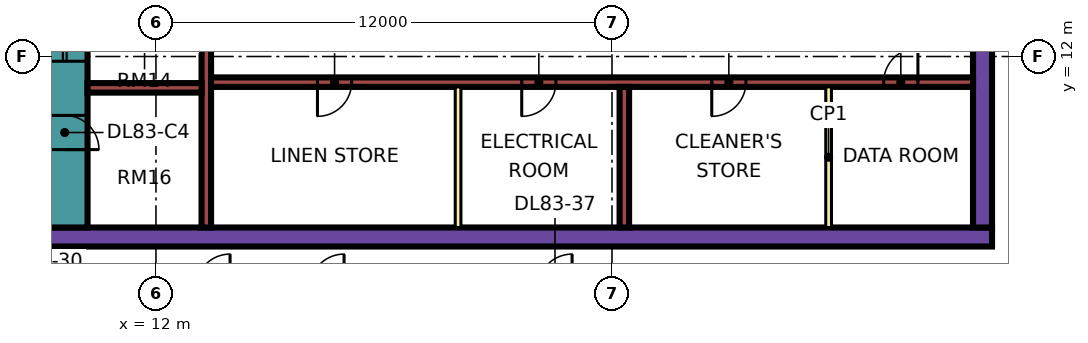
"""IFC4 building model, lengths in metres.
Left out: names, types, materials, properties, quantities, classifications, styles, units other than length and angle.
Written with IfcOpenShell. Run it as: python <this file> out.ifc"""

import sys

from ifc_helpers import new_model, si_unit, direction, frame, frame_2d, origin, place, context, subcontext, project, spatial, rectangle, extrude, element, fill, save


model = new_model("IFC4")
c1 = context("Model", 3, precision=1e-05, world=origin(), true_north=direction((0.0, 1.0)))
c2 = subcontext(c1, "Body", "Model", "MODEL_VIEW")
j1 = project(units=[si_unit("LENGTHUNIT", "METRE"), si_unit("PLANEANGLEUNIT", "RADIAN")], contexts=[c1])
p1 = place(None, origin())
s1 = spatial("IfcSite", under=j1, at=p1, CompositionType="ELEMENT")
p2 = place(p1, origin())
s2 = spatial("IfcBuilding", under=s1, at=p2, CompositionType="ELEMENT")
p3 = place(p2, frame((0.0, 0.0, 357.65)))
s3 = spatial("IfcBuildingStorey", under=s2, at=p3, CompositionType="ELEMENT", Elevation=357.65)
p4 = place(p3, frame((9.0, 7.25, 0.0), z_axis=(0.0, 0.0, 1.0), x_axis=(1.0, 0.0, 0.0)))
e1 = element("IfcWall", 1, at=p4, inside=s3, PredefinedType="SHEAR", context=c2, shape_type="SweptSolid", body=[
    extrude(rectangle(XDim=25.0, YDim=0.5, at=frame_2d((12.5, 0.0))), origin(), (0.0, 0.0, 1.0), 3.75),
])
p5 = place(p3, frame((9.6, 7.5, 0.0), z_axis=(0.0, 0.0, 1.0), x_axis=(0.0, 1.0, 0.0)))
e2 = element("IfcWall", 2, at=p5, inside=s3, PredefinedType="SHEAR", context=c2, shape_type="SweptSolid", body=[
    extrude(rectangle(XDim=12.0, YDim=1.2, at=frame_2d((6.0, 0.0))), origin(), (0.0, 0.0, 1.0), 3.75),
])
p6 = place(p5, frame((4.375, 0.0, 0.0)))
e3 = element("IfcOpeningElement", 3, at=p6, cuts=e2, PredefinedType="OPENING", context=c2, shape_type="SweptSolid", body=[
    extrude(rectangle(XDim=1.1, YDim=2.2, at=frame_2d((0.55, 1.1))), frame((0.0, 0.61, 0.0), z_axis=(0.0, -1.0, 0.0), x_axis=(1.0, 0.0, 0.0)), (0.0, 0.0, 1.0), 1.22),
])
p7 = place(p5, frame((6.875, 0.0, 0.0)))
e4 = element("IfcOpeningElement", 4, at=p7, cuts=e2, PredefinedType="OPENING", context=c2, shape_type="SweptSolid", body=[
    extrude(rectangle(XDim=1.1, YDim=2.2, at=frame_2d((0.55, 1.1))), frame((0.0, 0.61, 0.0), z_axis=(0.0, -1.0, 0.0), x_axis=(1.0, 0.0, 0.0)), (0.0, 0.0, 1.0), 1.22),
])
p8 = place(p5, frame((9.85, 0.0, 0.0)))
e5 = element("IfcOpeningElement", 5, at=p8, cuts=e2, PredefinedType="OPENING", context=c2, shape_type="SweptSolid", body=[
    extrude(rectangle(XDim=1.1, YDim=2.2, at=frame_2d((0.55, 1.1))), frame((0.0, 0.61, 0.0), z_axis=(0.0, -1.0, 0.0), x_axis=(1.0, 0.0, 0.0)), (0.0, 0.0, 1.0), 1.22),
])
p9 = place(p5, frame((2.05, 0.0, 0.0)))
e6 = element("IfcOpeningElement", 6, at=p9, cuts=e2, PredefinedType="OPENING", context=c2, shape_type="SweptSolid", body=[
    extrude(rectangle(XDim=0.9, YDim=2.1, at=frame_2d((0.45, 1.05))), frame((0.0, 0.61, 0.0), z_axis=(0.0, -1.0, 0.0), x_axis=(1.0, 0.0, 0.0)), (0.0, 0.0, 1.0), 1.22),
])
p10 = place(p3, frame((33.75, 7.5, 0.0), z_axis=(0.0, 0.0, 1.0), x_axis=(0.0, 1.0, 0.0)))
e7 = element("IfcWall", 7, at=p10, inside=s3, PredefinedType="SHEAR", context=c2, shape_type="SweptSolid", body=[
    extrude(rectangle(XDim=12.0, YDim=0.5, at=frame_2d((6.0, 0.0))), origin(), (0.0, 0.0, 1.0), 3.75),
])
p11 = place(p10, frame((5.7, 0.0, 0.0)))
e8 = element("IfcOpeningElement", 8, at=p11, cuts=e7, PredefinedType="OPENING", context=c2, shape_type="SweptSolid", body=[
    extrude(rectangle(XDim=1.8, YDim=2.4, at=frame_2d((0.9, 1.2))), frame((0.0, 0.26, 0.0), z_axis=(0.0, -1.0, 0.0), x_axis=(1.0, 0.0, 0.0)), (0.0, 0.0, 1.0), 0.52),
])
p12 = place(p3, frame((13.325, 7.5, 0.0), z_axis=(0.0, 0.0, 1.0), x_axis=(0.0, 1.0, 0.0)))
e9 = element("IfcWall", 9, at=p12, inside=s3, PredefinedType="SHEAR", context=c2, shape_type="SweptSolid", body=[
    extrude(rectangle(XDim=12.0, YDim=0.25, at=frame_2d((6.0, 0.0))), origin(), (0.0, 0.0, 1.0), 3.75),
])
p13 = place(p3, frame((13.45, 11.325, 0.0), z_axis=(0.0, 0.0, 1.0), x_axis=(1.0, 0.0, 0.0)))
e10 = element("IfcWall", 10, at=p13, inside=s3, PredefinedType="SHEAR", context=c2, shape_type="SweptSolid", body=[
    extrude(rectangle(XDim=20.05, YDim=0.25, at=frame_2d((10.025, 0.0))), origin(), (0.0, 0.0, 1.0), 3.75),
])
p14 = place(p13, frame((2.8, 0.0, 0.0)))
e11 = element("IfcOpeningElement", 11, at=p14, cuts=e10, PredefinedType="OPENING", context=c2, shape_type="SweptSolid", body=[
    extrude(rectangle(XDim=0.9, YDim=2.1, at=frame_2d((0.45, 1.05))), frame((0.0, 0.135, 0.0), z_axis=(0.0, -1.0, 0.0), x_axis=(1.0, 0.0, 0.0)), (0.0, 0.0, 1.0), 0.27),
])
p15 = place(p13, frame((8.175, 0.0, 0.0)))
e12 = element("IfcOpeningElement", 12, at=p15, cuts=e10, PredefinedType="OPENING", context=c2, shape_type="SweptSolid", body=[
    extrude(rectangle(XDim=0.9, YDim=2.1, at=frame_2d((0.45, 1.05))), frame((0.0, 0.135, 0.0), z_axis=(0.0, -1.0, 0.0), x_axis=(1.0, 0.0, 0.0)), (0.0, 0.0, 1.0), 0.27),
])
p16 = place(p13, frame((13.175, 0.0, 0.0)))
e13 = element("IfcOpeningElement", 13, at=p16, cuts=e10, PredefinedType="OPENING", context=c2, shape_type="SweptSolid", body=[
    extrude(rectangle(XDim=0.9, YDim=2.1, at=frame_2d((0.45, 1.05))), frame((0.0, 0.135, 0.0), z_axis=(0.0, -1.0, 0.0), x_axis=(1.0, 0.0, 0.0)), (0.0, 0.0, 1.0), 0.27),
])
p17 = place(p13, frame((17.7, 0.0, 0.0)))
e14 = element("IfcOpeningElement", 14, at=p17, cuts=e10, PredefinedType="OPENING", context=c2, shape_type="SweptSolid", body=[
    extrude(rectangle(XDim=0.9, YDim=2.1, at=frame_2d((0.45, 1.05))), frame((0.0, 0.135, 0.0), z_axis=(0.0, -1.0, 0.0), x_axis=(1.0, 0.0, 0.0)), (0.0, 0.0, 1.0), 0.27),
])
p18 = place(p3, frame((10.2, 11.175, 0.0), z_axis=(0.0, 0.0, 1.0), x_axis=(1.0, 0.0, 0.0)))
e15 = element("IfcWall", 15, at=p18, inside=s3, PredefinedType="SHEAR", context=c2, shape_type="SweptSolid", body=[
    extrude(rectangle(XDim=3.0, YDim=0.25, at=frame_2d((1.5, 0.0))), origin(), (0.0, 0.0, 1.0), 3.75),
])
p19 = place(p3, frame((24.325, 7.5, 0.0), z_axis=(0.0, 0.0, 1.0), x_axis=(0.0, 1.0, 0.0)))
e16 = element("IfcWall", 16, at=p19, inside=s3, PredefinedType="SHEAR", context=c2, shape_type="SweptSolid", body=[
    extrude(rectangle(XDim=3.7, YDim=0.25, at=frame_2d((1.85, 0.0))), origin(), (0.0, 0.0, 1.0), 3.75),
])
p20 = place(p3, frame((-1.447, 12.553, 0.0), z_axis=(0.0, 0.0, 1.0), x_axis=(0.707106781187, -0.707106781187, 0.0)))
e17 = element("IfcWall", 17, at=p20, inside=s3, PredefinedType="SOLIDWALL", context=c2, shape_type="SweptSolid", body=[
    extrude(rectangle(XDim=19.799, YDim=0.15, at=frame_2d((9.899, 0.0))), origin(), (0.0, 0.0, 1.0), 3.35),
])
p21 = place(p20, frame((2.212, 0.0, 0.45)))
e18 = element("IfcOpeningElement", 18, at=p21, cuts=e17, PredefinedType="OPENING", context=c2, shape_type="SweptSolid", body=[
    extrude(rectangle(XDim=3.0, YDim=2.4, at=frame_2d((1.5, 1.2))), frame((0.0, 0.085, 0.0), z_axis=(0.0, -1.0, 0.0), x_axis=(1.0, 0.0, 0.0)), (0.0, 0.0, 1.0), 0.17),
])
p22 = place(p20, frame((10.216, 0.0, 0.45)))
e19 = element("IfcOpeningElement", 19, at=p22, cuts=e17, PredefinedType="OPENING", context=c2, shape_type="SweptSolid", body=[
    extrude(rectangle(XDim=3.0, YDim=2.4, at=frame_2d((1.5, 1.2))), frame((0.0, 0.085, 0.0), z_axis=(0.0, -1.0, 0.0), x_axis=(1.0, 0.0, 0.0)), (0.0, 0.0, 1.0), 0.17),
])
for number, where, z_axis, x_axis in (
    (20, (19.95, 7.5, 0.0), (0.0, 0.0, 1.0), (0.0, 1.0, 0.0)),
    (21, (29.7, 7.5, 0.0), (0.0, 0.0, 1.0), (0.0, 1.0, 0.0)),
):
    element("IfcWall", number, at=place(p3, frame(where, z_axis=z_axis, x_axis=x_axis)), inside=s3, PredefinedType="PARTITIONING", context=c2, shape_type="SweptSolid", body=[
        extrude(rectangle(XDim=3.7, YDim=0.15, at=frame_2d((1.85, 0.0))), origin(), (0.0, 0.0, 1.0), 3.35),
    ])
p23 = place(p6, origin())
e22 = element("IfcDoor", 22, at=p23, inside=s3, OperationType="DOUBLE_DOOR_SLIDING", PredefinedType="DOOR", context=c2, shape_type="SweptSolid", body=[
    extrude(rectangle(XDim=1.1, YDim=2.2, at=frame_2d((0.55, 1.1))), frame((0.0, 0.025, 0.0), z_axis=(0.0, -1.0, 0.0), x_axis=(1.0, 0.0, 0.0)), (0.0, 0.0, 1.0), 0.05),
])
fill(e3, e22)
p24 = place(p9, frame((0.9, 0.0, 0.0), z_axis=(0.0, 0.0, 1.0), x_axis=(-1.0, 0.0, 0.0)))
e23 = element("IfcDoor", 23, at=p24, inside=s3, OperationType="SINGLE_SWING_LEFT", PredefinedType="DOOR", context=c2, shape_type="SweptSolid", body=[
    extrude(rectangle(XDim=0.9, YDim=2.1, at=frame_2d((0.45, 1.05))), frame((0.0, 0.025, 0.0), z_axis=(0.0, -1.0, 0.0), x_axis=(1.0, 0.0, 0.0)), (0.0, 0.0, 1.0), 0.05),
])
fill(e6, e23)
p25 = place(p14, frame((0.9, 0.0, 0.0), z_axis=(0.0, 0.0, 1.0), x_axis=(-1.0, 0.0, 0.0)))
e24 = element("IfcDoor", 24, at=p25, inside=s3, OperationType="SINGLE_SWING_LEFT", PredefinedType="DOOR", context=c2, shape_type="SweptSolid", body=[
    extrude(rectangle(XDim=0.9, YDim=2.1, at=frame_2d((0.45, 1.05))), frame((0.0, 0.025, 0.0), z_axis=(0.0, -1.0, 0.0), x_axis=(1.0, 0.0, 0.0)), (0.0, 0.0, 1.0), 0.05),
])
fill(e11, e24)
p26 = place(p15, frame((0.9, 0.0, 0.0), z_axis=(0.0, 0.0, 1.0), x_axis=(-1.0, 0.0, 0.0)))
e25 = element("IfcDoor", 25, at=p26, inside=s3, OperationType="SINGLE_SWING_LEFT", PredefinedType="DOOR", context=c2, shape_type="SweptSolid", body=[
    extrude(rectangle(XDim=0.9, YDim=2.1, at=frame_2d((0.45, 1.05))), frame((0.0, 0.025, 0.0), z_axis=(0.0, -1.0, 0.0), x_axis=(1.0, 0.0, 0.0)), (0.0, 0.0, 1.0), 0.05),
])
fill(e12, e25)
p27 = place(p16, frame((0.9, 0.0, 0.0), z_axis=(0.0, 0.0, 1.0), x_axis=(-1.0, 0.0, 0.0)))
e26 = element("IfcDoor", 26, at=p27, inside=s3, OperationType="SINGLE_SWING_LEFT", PredefinedType="DOOR", context=c2, shape_type="SweptSolid", body=[
    extrude(rectangle(XDim=0.9, YDim=2.1, at=frame_2d((0.45, 1.05))), frame((0.0, 0.025, 0.0), z_axis=(0.0, -1.0, 0.0), x_axis=(1.0, 0.0, 0.0)), (0.0, 0.0, 1.0), 0.05),
])
fill(e13, e26)
p28 = place(p17, frame((0.9, 0.0, 0.0), z_axis=(0.0, 0.0, 1.0), x_axis=(-1.0, 0.0, 0.0)))
e27 = element("IfcDoor", 27, at=p28, inside=s3, OperationType="SINGLE_SWING_RIGHT", PredefinedType="DOOR", context=c2, shape_type="SweptSolid", body=[
    extrude(rectangle(XDim=0.9, YDim=2.1, at=frame_2d((0.45, 1.05))), frame((0.0, 0.025, 0.0), z_axis=(0.0, -1.0, 0.0), x_axis=(1.0, 0.0, 0.0)), (0.0, 0.0, 1.0), 0.05),
])
fill(e14, e27)
save(model, sys.argv[1])
